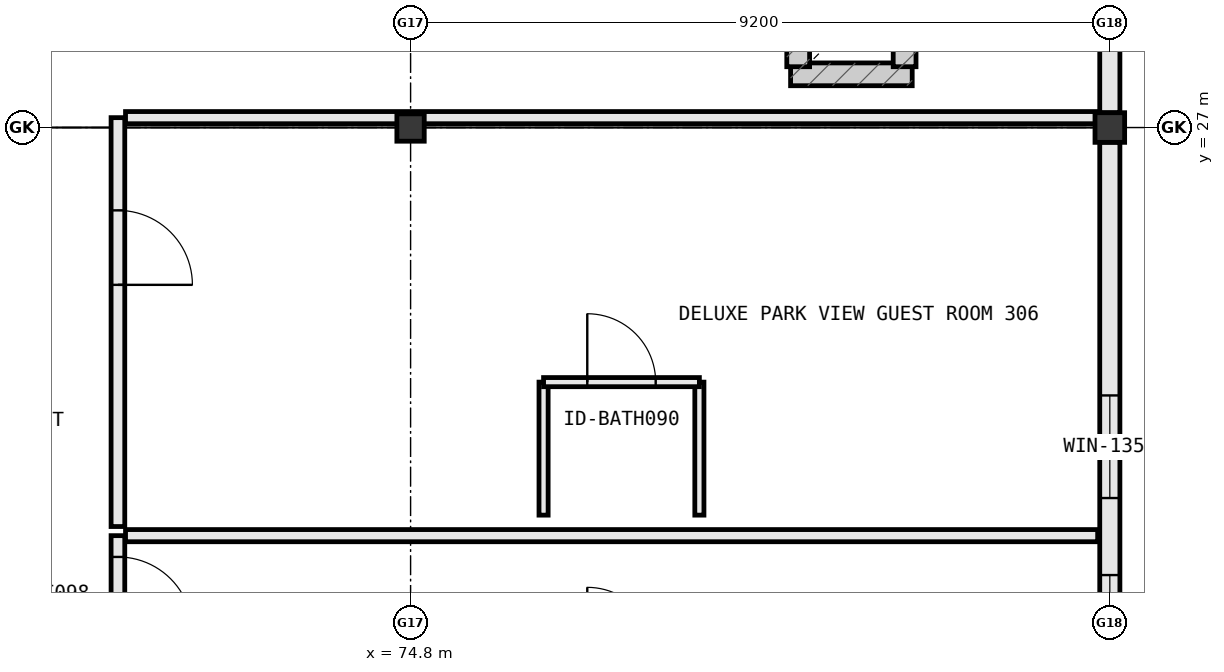
"""IFC4 building model, lengths in metres.
Left out: names, types, materials, properties, quantities, classifications, styles, units other than length and angle.
Written with IfcOpenShell. Run it as: python <this file> out.ifc"""

import sys

from ifc_helpers import new_model, si_unit, direction, frame, frame_2d, origin, origin_2d, place, context, subcontext, project, spatial, rectangle, extrude, element, fill, save


model = new_model("IFC4")
c1 = context("Model", 3, precision=1e-05, world=origin(), true_north=direction((0.0, 1.0)))
c2 = subcontext(c1, "Body", "Model", "MODEL_VIEW")
j1 = project(units=[si_unit("LENGTHUNIT", "METRE"), si_unit("PLANEANGLEUNIT", "RADIAN")], contexts=[c1])
p1 = place(None, origin())
s1 = spatial("IfcSite", under=j1, at=p1, CompositionType="ELEMENT")
p2 = place(p1, origin())
s2 = spatial("IfcBuilding", under=s1, at=p2, CompositionType="ELEMENT")
p3 = place(p2, frame((0.0, 0.0, 46.6)))
s3 = spatial("IfcBuildingStorey", under=s2, at=p3, CompositionType="ELEMENT", Elevation=46.6)
p4 = place(p3, frame((74.8, 27.0, 0.0), z_axis=(0.0, 0.0, 1.0), x_axis=(1.0, 0.0, 0.0)))
e1 = element("IfcColumn", 1, at=p4, inside=s3, PredefinedType="COLUMN", context=c2, shape_type="SweptSolid", body=[
    extrude(rectangle(XDim=0.36, YDim=0.36, at=origin_2d()), origin(), (0.0, 0.0, 1.0), 4.2),
])
p5 = place(p3, frame((84.0, 27.0, 0.0), z_axis=(0.0, 0.0, 1.0), x_axis=(1.0, 0.0, 0.0)))
e2 = element("IfcColumn", 2, at=p5, inside=s3, PredefinedType="COLUMN", context=c2, shape_type="SweptSolid", body=[
    extrude(rectangle(XDim=0.39, YDim=0.39, at=origin_2d()), origin(), (0.0, 0.0, 1.0), 4.2),
])
p6 = place(p3, frame((79.8, 27.7, 0.0), z_axis=(0.0, 0.0, 1.0), x_axis=(1.0, 0.0, 0.0)))
e3 = element("IfcWall", 3, at=p6, inside=s3, PredefinedType="SHEAR", context=c2, shape_type="SweptSolid", body=[
    extrude(rectangle(XDim=1.6, YDim=0.3, at=frame_2d((0.8, 0.0))), origin(), (0.0, 0.0, 1.0), 3.99),
])
for number, where, z_axis, x_axis in (
    (4, (79.9, 29.0, 0.0), (0.0, 0.0, 1.0), (0.0, -1.0, 0.0)),
    (5, (81.3, 27.8, 0.0), (0.0, 0.0, 1.0), (0.0, 1.0, 0.0)),
):
    element("IfcWall", number, at=place(p3, frame(where, z_axis=z_axis, x_axis=x_axis)), inside=s3, PredefinedType="SHEAR", context=c2, shape_type="SweptSolid", body=[
        extrude(rectangle(XDim=1.2, YDim=0.3, at=frame_2d((0.6, 0.0))), origin(), (0.0, 0.0, 1.0), 3.99),
    ])
p7 = place(p3, frame((84.0, 18.793, 0.0), z_axis=(0.0, 0.0, 1.0), x_axis=(0.0, 1.0, 0.0)))
e6 = element("IfcWall", 6, at=p7, inside=s3, PredefinedType="STANDARD", context=c2, shape_type="SweptSolid", body=[
    extrude(rectangle(XDim=8.014, YDim=0.265, at=frame_2d((4.007, 0.0))), origin(), (0.0, 0.0, 1.0), 3.99),
])
p8 = place(p7, frame((3.332, 0.0, 0.85)))
e7 = element("IfcOpeningElement", 7, at=p8, cuts=e6, PredefinedType="OPENING", context=c2, shape_type="SweptSolid", body=[
    extrude(rectangle(XDim=1.35, YDim=1.65, at=frame_2d((0.675, 0.825))), frame((0.0, 0.145, 0.0), z_axis=(0.0, -1.0, 0.0), x_axis=(1.0, 0.0, 0.0)), (0.0, 0.0, 1.0), 0.289),
])
p9 = place(p7, frame((0.519, 0.0, 0.85)))
e8 = element("IfcOpeningElement", 8, at=p9, cuts=e6, PredefinedType="OPENING", context=c2, shape_type="SweptSolid", body=[
    extrude(rectangle(XDim=1.8, YDim=1.85, at=frame_2d((0.9, 0.925))), frame((0.0, 0.145, 0.0), z_axis=(0.0, -1.0, 0.0), x_axis=(1.0, 0.0, 0.0)), (0.0, 0.0, 1.0), 0.289),
])
p10 = place(p3, frame((84.0, 27.193, 0.0), z_axis=(0.0, 0.0, 1.0), x_axis=(0.0, 1.0, 0.0)))
e9 = element("IfcWall", 9, at=p10, inside=s3, PredefinedType="STANDARD", context=c2, shape_type="SweptSolid", body=[
    extrude(rectangle(XDim=9.014, YDim=0.265, at=frame_2d((4.507, 0.0))), origin(), (0.0, 0.0, 1.0), 3.99),
])
p11 = place(p3, frame((70.95, 21.63, 0.0), z_axis=(0.0, 0.0, 1.0), x_axis=(0.0, -1.0, 0.0)))
e10 = element("IfcWall", 10, at=p11, inside=s3, PredefinedType="PARTITIONING", context=c2, shape_type="SweptSolid", body=[
    extrude(rectangle(XDim=3.48, YDim=0.18, at=frame_2d((1.74, 0.0))), origin(), (0.0, 0.0, 1.0), 3.99),
])
p12 = place(p11, frame((0.28, 0.0, 0.0)))
e11 = element("IfcOpeningElement", 11, at=p12, cuts=e10, PredefinedType="OPENING", context=c2, shape_type="SweptSolid", body=[
    extrude(rectangle(XDim=0.98, YDim=2.18, at=frame_2d((0.49, 1.09))), frame((0.0, 0.102, 0.0), z_axis=(0.0, -1.0, 0.0), x_axis=(1.0, 0.0, 0.0)), (0.0, 0.0, 1.0), 0.204),
])
p13 = place(p3, frame((71.05, 21.63, 0.0), z_axis=(0.0, 0.0, 1.0), x_axis=(1.0, 0.0, 0.0)))
e12 = element("IfcWall", 12, at=p13, inside=s3, PredefinedType="PARTITIONING", context=c2, shape_type="SweptSolid", body=[
    extrude(rectangle(XDim=12.79, YDim=0.16, at=frame_2d((6.395, 0.0))), origin(), (0.0, 0.0, 1.0), 3.99),
])
p14 = place(p3, frame((70.95, 27.13, 0.0), z_axis=(0.0, 0.0, 1.0), x_axis=(0.0, -1.0, 0.0)))
e13 = element("IfcWall", 13, at=p14, inside=s3, PredefinedType="PARTITIONING", context=c2, shape_type="SweptSolid", body=[
    extrude(rectangle(XDim=5.38, YDim=0.18, at=frame_2d((2.69, 0.0))), origin(), (0.0, 0.0, 1.0), 3.99),
])
p15 = place(p14, frame((1.22, 0.0, 0.0)))
e14 = element("IfcOpeningElement", 14, at=p15, cuts=e13, PredefinedType="OPENING", context=c2, shape_type="SweptSolid", body=[
    extrude(rectangle(XDim=0.98, YDim=2.18, at=frame_2d((0.49, 1.09))), frame((0.0, 0.102, 0.0), z_axis=(0.0, -1.0, 0.0), x_axis=(1.0, 0.0, 0.0)), (0.0, 0.0, 1.0), 0.204),
])
p16 = place(p3, frame((71.05, 27.13, 0.0), z_axis=(0.0, 0.0, 1.0), x_axis=(1.0, 0.0, 0.0)))
e15 = element("IfcWall", 15, at=p16, inside=s3, PredefinedType="PARTITIONING", context=c2, shape_type="SweptSolid", body=[
    extrude(rectangle(XDim=12.79, YDim=0.16, at=frame_2d((6.395, 0.0))), origin(), (0.0, 0.0, 1.0), 3.99),
])
for number, where, z_axis, x_axis in (
    (16, (76.55, 21.9, 0.0), (0.0, 0.0, 1.0), (0.0, 1.0, 0.0)),
    (17, (78.6, 21.9, 0.0), (0.0, 0.0, 1.0), (0.0, 1.0, 0.0)),
):
    element("IfcWall", number, at=place(p3, frame(where, z_axis=z_axis, x_axis=x_axis)), inside=s3, PredefinedType="PARTITIONING", context=c2, shape_type="SweptSolid", body=[
        extrude(rectangle(XDim=1.75, YDim=0.12, at=frame_2d((0.875, 0.0))), origin(), (0.0, 0.0, 1.0), 3.99),
    ])
p17 = place(p3, frame((76.55, 23.65, 0.0), z_axis=(0.0, 0.0, 1.0), x_axis=(1.0, 0.0, 0.0)))
e18 = element("IfcWall", 18, at=p17, inside=s3, PredefinedType="PARTITIONING", context=c2, shape_type="SweptSolid", body=[
    extrude(rectangle(XDim=2.05, YDim=0.12, at=frame_2d((1.025, 0.0))), origin(), (0.0, 0.0, 1.0), 3.99),
])
p18 = place(p17, frame((0.575, 0.0, 0.0)))
e19 = element("IfcOpeningElement", 19, at=p18, cuts=e18, PredefinedType="OPENING", context=c2, shape_type="SweptSolid", body=[
    extrude(rectangle(XDim=0.9, YDim=2.15, at=frame_2d((0.45, 1.075))), frame((0.0, 0.072, 0.0), z_axis=(0.0, -1.0, 0.0), x_axis=(1.0, 0.0, 0.0)), (0.0, 0.0, 1.0), 0.144),
])
p19 = place(p8, origin())
e20 = element("IfcWindow", 20, at=p19, inside=s3, PartitioningType="SINGLE_PANEL", PredefinedType="WINDOW", context=c2, shape_type="SweptSolid", body=[
    extrude(rectangle(XDim=1.35, YDim=1.65, at=frame_2d((0.675, 0.825))), frame((0.0, 0.03, 0.0), z_axis=(0.0, -1.0, 0.0), x_axis=(1.0, 0.0, 0.0)), (0.0, 0.0, 1.0), 0.06),
])
fill(e7, e20)
p20 = place(p9, origin())
e21 = element("IfcWindow", 21, at=p20, inside=s3, PartitioningType="SINGLE_PANEL", PredefinedType="WINDOW", context=c2, shape_type="SweptSolid", body=[
    extrude(rectangle(XDim=1.8, YDim=1.85, at=frame_2d((0.9, 0.925))), frame((0.0, 0.03, 0.0), z_axis=(0.0, -1.0, 0.0), x_axis=(1.0, 0.0, 0.0)), (0.0, 0.0, 1.0), 0.06),
])
fill(e8, e21)
p21 = place(p12, origin())
e22 = element("IfcDoor", 22, at=p21, inside=s3, OperationType="SINGLE_SWING_RIGHT", PredefinedType="DOOR", context=c2, shape_type="SweptSolid", body=[
    extrude(rectangle(XDim=0.98, YDim=2.18, at=frame_2d((0.49, 1.09))), frame((0.0, 0.025, 0.0), z_axis=(0.0, -1.0, 0.0), x_axis=(1.0, 0.0, 0.0)), (0.0, 0.0, 1.0), 0.05),
])
fill(e11, e22)
p22 = place(p15, origin())
e23 = element("IfcDoor", 23, at=p22, inside=s3, OperationType="SINGLE_SWING_RIGHT", PredefinedType="DOOR", context=c2, shape_type="SweptSolid", body=[
    extrude(rectangle(XDim=0.98, YDim=2.18, at=frame_2d((0.49, 1.09))), frame((0.0, 0.025, 0.0), z_axis=(0.0, -1.0, 0.0), x_axis=(1.0, 0.0, 0.0)), (0.0, 0.0, 1.0), 0.05),
])
fill(e14, e23)
p23 = place(p18, origin())
e24 = element("IfcDoor", 24, at=p23, inside=s3, OperationType="SINGLE_SWING_LEFT", PredefinedType="DOOR", context=c2, shape_type="SweptSolid", body=[
    extrude(rectangle(XDim=0.9, YDim=2.15, at=frame_2d((0.45, 1.075))), frame((0.0, 0.025, 0.0), z_axis=(0.0, -1.0, 0.0), x_axis=(1.0, 0.0, 0.0)), (0.0, 0.0, 1.0), 0.05),
])
fill(e19, e24)
save(model, sys.argv[1])
